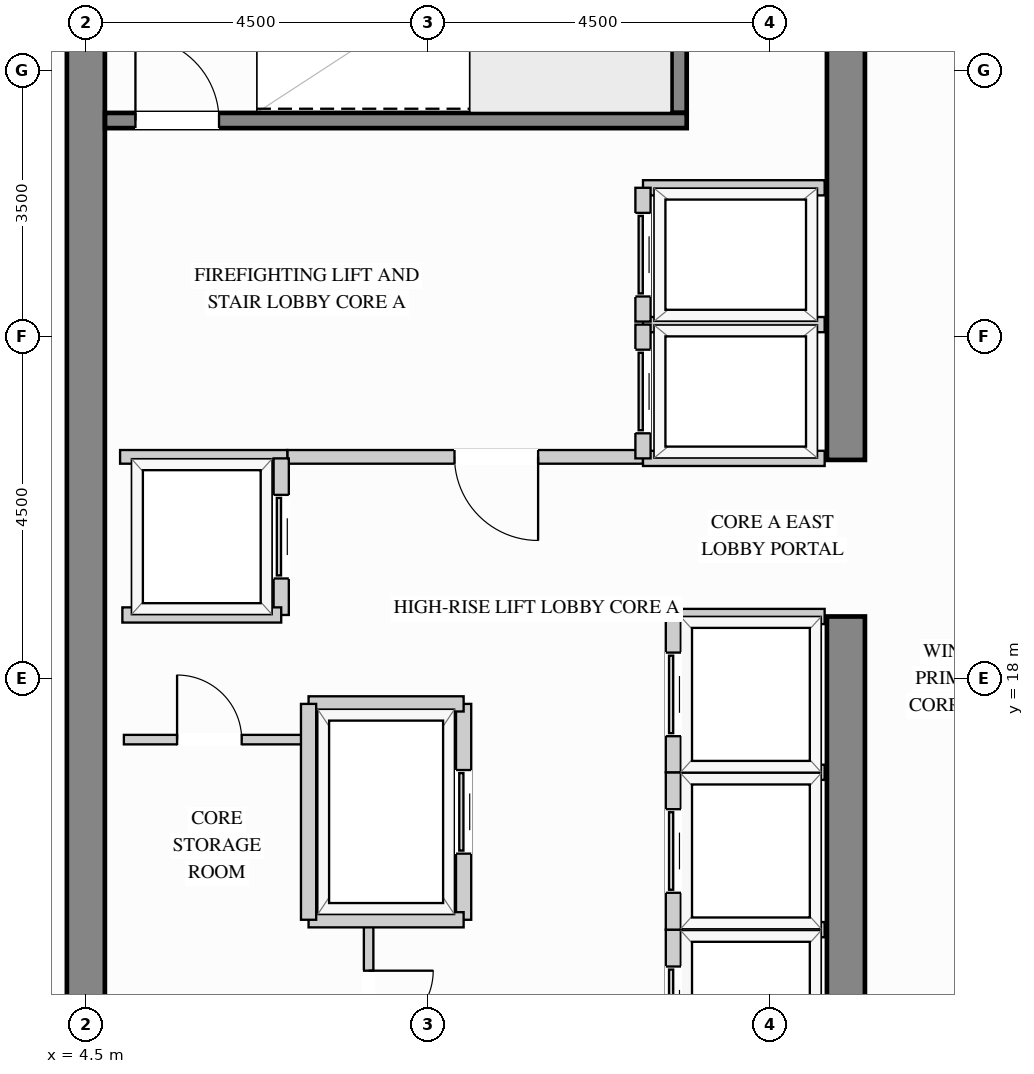
"""IFC4 building model, lengths in metres.
Left out: names, types, materials, properties, quantities, classifications, styles, units other than length and angle.
Written with IfcOpenShell. Run it as: python <this file> out.ifc"""

import sys

from ifc_helpers import new_model, si_unit, direction, frame, frame_2d, origin, place, context, subcontext, project, spatial, rectangle, extrude, source, transform, mapped, element, fill, save


model = new_model("IFC4")
c1 = context("Model", 3, precision=1e-05, world=origin(), true_north=direction((0.0, 1.0)))
c2 = subcontext(c1, "Body", "Model", "MODEL_VIEW")
j1 = project(units=[si_unit("LENGTHUNIT", "METRE"), si_unit("PLANEANGLEUNIT", "RADIAN")], contexts=[c1])
p1 = place(None, origin())
s1 = spatial("IfcSite", under=j1, at=p1, CompositionType="ELEMENT")
p2 = place(p1, origin())
s2 = spatial("IfcBuilding", under=s1, at=p2, CompositionType="ELEMENT")
p3 = place(p2, frame((0.0, 0.0, 237.6)))
s3 = spatial("IfcBuildingStorey", under=s2, at=p3, CompositionType="ELEMENT", Elevation=237.6)
m1 = source(origin(), c2, "Body", "SweptSolid", [
    extrude(rectangle(XDim=10.07, YDim=0.5, at=frame_2d((5.035, 0.0))), origin(), (0.0, 0.0, 1.0), 3.4),
])
p4 = place(p3, frame((14.5, 8.75, 0.0), z_axis=(0.0, 0.0, 1.0), x_axis=(0.0, 1.0, 0.0)))
e1 = element("IfcWall", 1, at=p4, inside=s3, PredefinedType="SHEAR", context=c2, shape_type="MappedRepresentation", body=[
    mapped(m1, transform((0.0, 0.0, 0.0), x_axis=(1.0, 0.0, 0.0), y_axis=(0.0, 1.0, 0.0), z_axis=(0.0, 0.0, 1.0))),
])
m2 = source(origin(), c2, "Body", "SweptSolid", [
    extrude(rectangle(XDim=8.37, YDim=0.5, at=frame_2d((4.185, 0.0))), origin(), (0.0, 0.0, 1.0), 3.4),
])
p5 = place(p3, frame((14.5, 20.88, 0.0), z_axis=(0.0, 0.0, 1.0), x_axis=(0.0, 1.0, 0.0)))
e2 = element("IfcWall", 2, at=p5, inside=s3, PredefinedType="SHEAR", context=c2, shape_type="MappedRepresentation", body=[
    mapped(m2, transform((0.0, 0.0, 0.0), x_axis=(1.0, 0.0, 0.0), y_axis=(0.0, 1.0, 0.0), z_axis=(0.0, 0.0, 1.0))),
])
m3 = source(origin(), c2, "Body", "SweptSolid", [
    extrude(rectangle(XDim=20.5, YDim=0.5, at=frame_2d((10.25, 0.0))), origin(), (0.0, 0.0, 1.0), 3.4),
])
p6 = place(p3, frame((4.5, 8.75, 0.0), z_axis=(0.0, 0.0, 1.0), x_axis=(0.0, 1.0, 0.0)))
e3 = element("IfcWall", 3, at=p6, inside=s3, PredefinedType="SHEAR", context=c2, shape_type="MappedRepresentation", body=[
    mapped(m3, transform((0.0, 0.0, 0.0), x_axis=(1.0, 0.0, 0.0), y_axis=(0.0, 1.0, 0.0), z_axis=(0.0, 0.0, 1.0))),
])
p7 = place(p3, frame((7.15, 20.92, 0.0), z_axis=(0.0, 0.0, 1.0), x_axis=(1.0, 0.0, 0.0)))
e4 = element("IfcWall", 4, at=p7, inside=s3, PredefinedType="PARTITIONING", context=c2, shape_type="SweptSolid", body=[
    extrude(rectangle(XDim=4.68, YDim=0.18, at=frame_2d((2.34, 0.0))), origin(), (0.0, 0.0, 1.0), 3.385),
])
p8 = place(p7, frame((2.2, 0.0, 0.0)))
e5 = element("IfcOpeningElement", 5, at=p8, cuts=e4, PredefinedType="OPENING", context=c2, shape_type="SweptSolid", body=[
    extrude(rectangle(XDim=1.1, YDim=2.15, at=frame_2d((0.55, 1.075))), frame((0.0, 0.1, 0.0), z_axis=(0.0, -1.0, 0.0), x_axis=(1.0, 0.0, 0.0)), (0.0, 0.0, 1.0), 0.2),
])
m4 = source(origin(), c2, "Body", "SweptSolid", [
    extrude(rectangle(XDim=2.2, YDim=0.18, at=frame_2d((1.1, 0.0))), origin(), (0.0, 0.0, 1.0), 3.385),
])
p9 = place(p3, frame((4.95, 20.92, 0.0), z_axis=(0.0, 0.0, 1.0), x_axis=(1.0, 0.0, 0.0)))
e6 = element("IfcWall", 6, at=p9, inside=s3, PredefinedType="PARTITIONING", context=c2, shape_type="MappedRepresentation", body=[
    mapped(m4, transform((0.0, 0.0, 0.0), x_axis=(1.0, 0.0, 0.0), y_axis=(0.0, 1.0, 0.0), z_axis=(0.0, 0.0, 1.0))),
])
p10 = place(p3, frame((8.22, 12.75, 0.0), z_axis=(0.0, 0.0, 1.0), x_axis=(0.0, 1.0, 0.0)))
e7 = element("IfcWall", 7, at=p10, inside=s3, PredefinedType="PARTITIONING", context=c2, shape_type="SweptSolid", body=[
    extrude(rectangle(XDim=2.07, YDim=0.125, at=frame_2d((1.035, 0.0))), origin(), (0.0, 0.0, 1.0), 3.385),
])
p11 = place(p10, frame((0.56, 0.0, 0.0)))
e8 = element("IfcOpeningElement", 8, at=p11, cuts=e7, PredefinedType="OPENING", context=c2, shape_type="SweptSolid", body=[
    extrude(rectangle(XDim=0.85, YDim=2.1, at=frame_2d((0.425, 1.05))), frame((0.0, 0.073, 0.0), z_axis=(0.0, -1.0, 0.0), x_axis=(1.0, 0.0, 0.0)), (0.0, 0.0, 1.0), 0.145),
])
p12 = place(p3, frame((5.0, 17.2, 0.0), z_axis=(0.0, 0.0, 1.0), x_axis=(1.0, 0.0, 0.0)))
e9 = element("IfcWall", 9, at=p12, inside=s3, PredefinedType="PARTITIONING", context=c2, shape_type="SweptSolid", body=[
    extrude(rectangle(XDim=2.4, YDim=0.125, at=frame_2d((1.2, 0.0))), origin(), (0.0, 0.0, 1.0), 3.385),
])
p13 = place(p12, frame((0.7, 0.0, 0.0)))
e10 = element("IfcOpeningElement", 10, at=p13, cuts=e9, PredefinedType="OPENING", context=c2, shape_type="SweptSolid", body=[
    extrude(rectangle(XDim=0.85, YDim=2.1, at=frame_2d((0.425, 1.05))), frame((0.0, 0.073, 0.0), z_axis=(0.0, -1.0, 0.0), x_axis=(1.0, 0.0, 0.0)), (0.0, 0.0, 1.0), 0.145),
])
m5 = source(origin(), c2, "Body", "SweptSolid", [
    extrude(rectangle(XDim=2.39, YDim=0.2, at=frame_2d((1.195, 0.0))), origin(), (0.0, 0.0, 1.0), 3.385),
])
for number, where, z_axis, x_axis in (
    (11, (11.83, 22.66, 0.0), (0.0, 0.0, 1.0), (1.0, 0.0, 0.0)),
    (12, (11.83, 20.9, 0.0), (0.0, 0.0, 1.0), (1.0, 0.0, 0.0)),
):
    element("IfcWall", number, at=place(p3, frame(where, z_axis=z_axis, x_axis=x_axis)), inside=s3, PredefinedType="PARTITIONING", context=c2, shape_type="MappedRepresentation", body=[
        mapped(m5, transform((0.0, 0.0, 0.0), x_axis=(1.0, 0.0, 0.0), y_axis=(0.0, 1.0, 0.0), z_axis=(0.0, 0.0, 1.0))),
    ])
p14 = place(p3, frame((11.83, 20.9, 0.0), z_axis=(0.0, 0.0, 1.0), x_axis=(0.0, 1.0, 0.0)))
e13 = element("IfcWall", 13, at=p14, inside=s3, PredefinedType="PARTITIONING", context=c2, shape_type="SweptSolid", body=[
    extrude(rectangle(XDim=1.76, YDim=0.2, at=frame_2d((0.88, 0.0))), origin(), (0.0, 0.0, 1.0), 3.385),
])
p15 = place(p14, frame((0.33, 0.0, 0.0)))
e14 = element("IfcOpeningElement", 14, at=p15, cuts=e13, PredefinedType="OPENING", context=c2, shape_type="SweptSolid", body=[
    extrude(rectangle(XDim=1.1, YDim=2.2, at=frame_2d((0.55, 1.1))), frame((0.0, 0.11, 0.0), z_axis=(0.0, -1.0, 0.0), x_axis=(1.0, 0.0, 0.0)), (0.0, 0.0, 1.0), 0.22),
])
p16 = place(p3, frame((11.83, 24.46, 0.0), z_axis=(0.0, 0.0, 1.0), x_axis=(1.0, 0.0, 0.0)))
e15 = element("IfcWall", 15, at=p16, inside=s3, PredefinedType="PARTITIONING", context=c2, shape_type="MappedRepresentation", body=[
    mapped(m5, transform((0.0, 0.0, 0.0), x_axis=(1.0, 0.0, 0.0), y_axis=(0.0, 1.0, 0.0), z_axis=(0.0, 0.0, 1.0))),
])
p17 = place(p3, frame((11.83, 22.7, 0.0), z_axis=(0.0, 0.0, 1.0), x_axis=(0.0, 1.0, 0.0)))
e16 = element("IfcWall", 16, at=p17, inside=s3, PredefinedType="PARTITIONING", context=c2, shape_type="SweptSolid", body=[
    extrude(rectangle(XDim=1.76, YDim=0.2, at=frame_2d((0.88, 0.0))), origin(), (0.0, 0.0, 1.0), 3.385),
])
p18 = place(p17, frame((0.33, 0.0, 0.0)))
e17 = element("IfcOpeningElement", 17, at=p18, cuts=e16, PredefinedType="OPENING", context=c2, shape_type="SweptSolid", body=[
    extrude(rectangle(XDim=1.1, YDim=2.2, at=frame_2d((0.55, 1.1))), frame((0.0, 0.11, 0.0), z_axis=(0.0, -1.0, 0.0), x_axis=(1.0, 0.0, 0.0)), (0.0, 0.0, 1.0), 0.22),
])
m6 = source(origin(), c2, "Body", "SweptSolid", [
    extrude(rectangle(XDim=1.99, YDim=0.2, at=frame_2d((0.995, 0.0))), origin(), (0.0, 0.0, 1.0), 3.385),
])
p19 = place(p3, frame((12.23, 14.7, 0.0), z_axis=(0.0, 0.0, 1.0), x_axis=(1.0, 0.0, 0.0)))
e18 = element("IfcWall", 18, at=p19, inside=s3, PredefinedType="PARTITIONING", context=c2, shape_type="MappedRepresentation", body=[
    mapped(m6, transform((0.0, 0.0, 0.0), x_axis=(1.0, 0.0, 0.0), y_axis=(0.0, 1.0, 0.0), z_axis=(0.0, 0.0, 1.0))),
])
p20 = place(p3, frame((12.23, 12.63, 0.0), z_axis=(0.0, 0.0, 1.0), x_axis=(0.0, 1.0, 0.0)))
e19 = element("IfcWall", 19, at=p20, inside=s3, PredefinedType="PARTITIONING", context=c2, shape_type="SweptSolid", body=[
    extrude(rectangle(XDim=2.07, YDim=0.2, at=frame_2d((1.035, 0.0))), origin(), (0.0, 0.0, 1.0), 3.385),
])
p21 = place(p20, frame((0.485, 0.0, 0.0)))
e20 = element("IfcOpeningElement", 20, at=p21, cuts=e19, PredefinedType="OPENING", context=c2, shape_type="SweptSolid", body=[
    extrude(rectangle(XDim=1.1, YDim=2.2, at=frame_2d((0.55, 1.1))), frame((0.0, 0.11, 0.0), z_axis=(0.0, -1.0, 0.0), x_axis=(1.0, 0.0, 0.0)), (0.0, 0.0, 1.0), 0.22),
])
p22 = place(p3, frame((12.23, 16.77, 0.0), z_axis=(0.0, 0.0, 1.0), x_axis=(1.0, 0.0, 0.0)))
e21 = element("IfcWall", 21, at=p22, inside=s3, PredefinedType="PARTITIONING", context=c2, shape_type="MappedRepresentation", body=[
    mapped(m6, transform((0.0, 0.0, 0.0), x_axis=(1.0, 0.0, 0.0), y_axis=(0.0, 1.0, 0.0), z_axis=(0.0, 0.0, 1.0))),
])
p23 = place(p3, frame((12.23, 14.7, 0.0), z_axis=(0.0, 0.0, 1.0), x_axis=(0.0, 1.0, 0.0)))
e22 = element("IfcWall", 22, at=p23, inside=s3, PredefinedType="PARTITIONING", context=c2, shape_type="SweptSolid", body=[
    extrude(rectangle(XDim=2.07, YDim=0.2, at=frame_2d((1.035, 0.0))), origin(), (0.0, 0.0, 1.0), 3.385),
])
p24 = place(p23, frame((0.485, 0.0, 0.0)))
e23 = element("IfcOpeningElement", 23, at=p24, cuts=e22, PredefinedType="OPENING", context=c2, shape_type="SweptSolid", body=[
    extrude(rectangle(XDim=1.1, YDim=2.2, at=frame_2d((0.55, 1.1))), frame((0.0, 0.11, 0.0), z_axis=(0.0, -1.0, 0.0), x_axis=(1.0, 0.0, 0.0)), (0.0, 0.0, 1.0), 0.22),
])
p25 = place(p3, frame((12.23, 18.82, 0.0), z_axis=(0.0, 0.0, 1.0), x_axis=(1.0, 0.0, 0.0)))
e24 = element("IfcWall", 24, at=p25, inside=s3, PredefinedType="PARTITIONING", context=c2, shape_type="MappedRepresentation", body=[
    mapped(m6, transform((0.0, 0.0, 0.0), x_axis=(1.0, 0.0, 0.0), y_axis=(0.0, 1.0, 0.0), z_axis=(0.0, 0.0, 1.0))),
])
p26 = place(p3, frame((12.23, 16.77, 0.0), z_axis=(0.0, 0.0, 1.0), x_axis=(0.0, 1.0, 0.0)))
e25 = element("IfcWall", 25, at=p26, inside=s3, PredefinedType="PARTITIONING", context=c2, shape_type="SweptSolid", body=[
    extrude(rectangle(XDim=2.05, YDim=0.2, at=frame_2d((1.025, 0.0))), origin(), (0.0, 0.0, 1.0), 3.385),
])
p27 = place(p26, frame((0.475, 0.0, 0.0)))
e26 = element("IfcOpeningElement", 26, at=p27, cuts=e25, PredefinedType="OPENING", context=c2, shape_type="SweptSolid", body=[
    extrude(rectangle(XDim=1.1, YDim=2.2, at=frame_2d((0.55, 1.1))), frame((0.0, 0.11, 0.0), z_axis=(0.0, -1.0, 0.0), x_axis=(1.0, 0.0, 0.0)), (0.0, 0.0, 1.0), 0.22),
])
p28 = place(p3, frame((7.07, 18.84, 0.0), z_axis=(0.0, 0.0, 1.0), x_axis=(0.0, 1.0, 0.0)))
e27 = element("IfcWall", 27, at=p28, inside=s3, PredefinedType="PARTITIONING", context=c2, shape_type="SweptSolid", body=[
    extrude(rectangle(XDim=2.06, YDim=0.2, at=frame_2d((1.03, 0.0))), origin(), (0.0, 0.0, 1.0), 3.385),
])
p29 = place(p28, frame((0.48, 0.0, 0.0)))
e28 = element("IfcOpeningElement", 28, at=p29, cuts=e27, PredefinedType="OPENING", context=c2, shape_type="SweptSolid", body=[
    extrude(rectangle(XDim=1.1, YDim=2.2, at=frame_2d((0.55, 1.1))), frame((0.0, 0.11, 0.0), z_axis=(0.0, -1.0, 0.0), x_axis=(1.0, 0.0, 0.0)), (0.0, 0.0, 1.0), 0.22),
])
m7 = source(origin(), c2, "Body", "SweptSolid", [
    extrude(rectangle(XDim=2.09, YDim=0.2, at=frame_2d((1.045, 0.0))), origin(), (0.0, 0.0, 1.0), 3.385),
])
p30 = place(p3, frame((4.98, 18.84, 0.0), z_axis=(0.0, 0.0, 1.0), x_axis=(1.0, 0.0, 0.0)))
e29 = element("IfcWall", 29, at=p30, inside=s3, PredefinedType="PARTITIONING", context=c2, shape_type="MappedRepresentation", body=[
    mapped(m7, transform((0.0, 0.0, 0.0), x_axis=(1.0, 0.0, 0.0), y_axis=(0.0, 1.0, 0.0), z_axis=(0.0, 0.0, 1.0))),
])
p31 = place(p3, frame((9.47, 14.83, 0.0), z_axis=(0.0, 0.0, 1.0), x_axis=(0.0, 1.0, 0.0)))
e30 = element("IfcWall", 30, at=p31, inside=s3, PredefinedType="PARTITIONING", context=c2, shape_type="SweptSolid", body=[
    extrude(rectangle(XDim=2.84, YDim=0.2, at=frame_2d((1.42, 0.0))), origin(), (0.0, 0.0, 1.0), 3.385),
])
p32 = place(p31, frame((0.87, 0.0, 0.0)))
e31 = element("IfcOpeningElement", 31, at=p32, cuts=e30, PredefinedType="OPENING", context=c2, shape_type="SweptSolid", body=[
    extrude(rectangle(XDim=1.1, YDim=2.2, at=frame_2d((0.55, 1.1))), frame((0.0, 0.11, 0.0), z_axis=(0.0, -1.0, 0.0), x_axis=(1.0, 0.0, 0.0)), (0.0, 0.0, 1.0), 0.22),
])
m8 = source(origin(), c2, "Body", "SweptSolid", [
    extrude(rectangle(XDim=2.04, YDim=0.2, at=frame_2d((1.02, 0.0))), origin(), (0.0, 0.0, 1.0), 3.385),
])
for number, where, z_axis, x_axis in (
    (32, (7.43, 17.67, 0.0), (0.0, 0.0, 1.0), (1.0, 0.0, 0.0)),
    (33, (7.43, 14.83, 0.0), (0.0, 0.0, 1.0), (1.0, 0.0, 0.0)),
):
    element("IfcWall", number, at=place(p3, frame(where, z_axis=z_axis, x_axis=x_axis)), inside=s3, PredefinedType="PARTITIONING", context=c2, shape_type="MappedRepresentation", body=[
        mapped(m8, transform((0.0, 0.0, 0.0), x_axis=(1.0, 0.0, 0.0), y_axis=(0.0, 1.0, 0.0), z_axis=(0.0, 0.0, 1.0))),
    ])
m9 = source(origin(), c2, "Body", "SweptSolid", [
    extrude(rectangle(XDim=2.84, YDim=0.2, at=frame_2d((1.42, 0.0))), origin(), (0.0, 0.0, 1.0), 3.385),
])
p33 = place(p3, frame((7.43, 14.83, 0.0), z_axis=(0.0, 0.0, 1.0), x_axis=(0.0, 1.0, 0.0)))
e34 = element("IfcWall", 34, at=p33, inside=s3, PredefinedType="PARTITIONING", context=c2, shape_type="MappedRepresentation", body=[
    mapped(m9, transform((0.0, 0.0, 0.0), x_axis=(1.0, 0.0, 0.0), y_axis=(0.0, 1.0, 0.0), z_axis=(0.0, 0.0, 1.0))),
])
m10 = source(origin(), c2, "Body", "SweptSolid", [
    extrude(rectangle(XDim=3.803, YDim=0.2, at=frame_2d((1.901, 0.0))), origin(), (0.0, 0.0, 1.0), 3.4),
])
p34 = place(p3, frame((12.305, 25.445, 0.0), z_axis=(0.0, 0.0, 1.0), x_axis=(0.0, 1.0, 0.0)))
e35 = element("IfcWall", 35, at=p34, inside=s3, PredefinedType="SHEAR", context=c2, shape_type="MappedRepresentation", body=[
    mapped(m10, transform((0.0, 0.0, 0.0), x_axis=(1.0, 0.0, 0.0), y_axis=(0.0, 1.0, 0.0), z_axis=(0.0, 0.0, 1.0))),
])
p35 = place(p3, frame((4.752, 25.345, 0.0), z_axis=(0.0, 0.0, 1.0), x_axis=(1.0, 0.0, 0.0)))
e36 = element("IfcWall", 36, at=p35, inside=s3, PredefinedType="SHEAR", context=c2, shape_type="SweptSolid", body=[
    extrude(rectangle(XDim=7.653, YDim=0.2, at=frame_2d((3.827, 0.0))), origin(), (0.0, 0.0, 1.0), 3.4),
])
p36 = place(p35, frame((0.4, 0.0, 0.0)))
e37 = element("IfcOpeningElement", 37, at=p36, cuts=e36, PredefinedType="OPENING", context=c2, shape_type="SweptSolid", body=[
    extrude(rectangle(XDim=1.1, YDim=2.15, at=frame_2d((0.55, 1.075))), frame((0.0, 0.11, 0.0), z_axis=(0.0, -1.0, 0.0), x_axis=(1.0, 0.0, 0.0)), (0.0, 0.0, 1.0), 0.22),
])
m11 = source(origin(), c2, "Body", "SweptSolid", [
    extrude(rectangle(XDim=1.1, YDim=2.15, at=frame_2d((0.55, 1.075))), frame((0.0, 0.025, 0.0), z_axis=(0.0, -1.0, 0.0), x_axis=(1.0, 0.0, 0.0)), (0.0, 0.0, 1.0), 0.05),
])
p37 = place(p8, origin())
e38 = element("IfcDoor", 38, at=p37, inside=s3, OperationType="SINGLE_SWING_RIGHT", PredefinedType="DOOR", context=c2, shape_type="MappedRepresentation", body=[
    mapped(m11, transform((0.0, 0.0, 0.0), x_axis=(1.0, 0.0, 0.0), y_axis=(0.0, 1.0, 0.0), z_axis=(0.0, 0.0, 1.0))),
])
fill(e5, e38)
m12 = source(origin(), c2, "Body", "SweptSolid", [
    extrude(rectangle(XDim=1.1, YDim=2.2, at=frame_2d((0.55, 1.1))), frame((0.0, 0.025, 0.0), z_axis=(0.0, -1.0, 0.0), x_axis=(1.0, 0.0, 0.0)), (0.0, 0.0, 1.0), 0.05),
])
p38 = place(p15, origin())
e39 = element("IfcDoor", 39, at=p38, inside=s3, OperationType="SLIDING_TO_LEFT", PredefinedType="DOOR", context=c2, shape_type="MappedRepresentation", body=[
    mapped(m12, transform((0.0, 0.0, 0.0), x_axis=(1.0, 0.0, 0.0), y_axis=(0.0, 1.0, 0.0), z_axis=(0.0, 0.0, 1.0))),
])
fill(e14, e39)
p39 = place(p18, origin())
e40 = element("IfcDoor", 40, at=p39, inside=s3, OperationType="SLIDING_TO_LEFT", PredefinedType="DOOR", context=c2, shape_type="MappedRepresentation", body=[
    mapped(m12, transform((0.0, 0.0, 0.0), x_axis=(1.0, 0.0, 0.0), y_axis=(0.0, 1.0, 0.0), z_axis=(0.0, 0.0, 1.0))),
])
fill(e17, e40)
p40 = place(p21, origin())
e41 = element("IfcDoor", 41, at=p40, inside=s3, OperationType="SLIDING_TO_LEFT", PredefinedType="DOOR", context=c2, shape_type="MappedRepresentation", body=[
    mapped(m12, transform((0.0, 0.0, 0.0), x_axis=(1.0, 0.0, 0.0), y_axis=(0.0, 1.0, 0.0), z_axis=(0.0, 0.0, 1.0))),
])
fill(e20, e41)
p41 = place(p24, origin())
e42 = element("IfcDoor", 42, at=p41, inside=s3, OperationType="SLIDING_TO_LEFT", PredefinedType="DOOR", context=c2, shape_type="MappedRepresentation", body=[
    mapped(m12, transform((0.0, 0.0, 0.0), x_axis=(1.0, 0.0, 0.0), y_axis=(0.0, 1.0, 0.0), z_axis=(0.0, 0.0, 1.0))),
])
fill(e23, e42)
p42 = place(p27, origin())
e43 = element("IfcDoor", 43, at=p42, inside=s3, OperationType="SLIDING_TO_LEFT", PredefinedType="DOOR", context=c2, shape_type="MappedRepresentation", body=[
    mapped(m12, transform((0.0, 0.0, 0.0), x_axis=(1.0, 0.0, 0.0), y_axis=(0.0, 1.0, 0.0), z_axis=(0.0, 0.0, 1.0))),
])
fill(e26, e43)
p43 = place(p29, origin())
e44 = element("IfcDoor", 44, at=p43, inside=s3, OperationType="SLIDING_TO_LEFT", PredefinedType="DOOR", context=c2, shape_type="MappedRepresentation", body=[
    mapped(m12, transform((0.0, 0.0, 0.0), x_axis=(1.0, 0.0, 0.0), y_axis=(0.0, 1.0, 0.0), z_axis=(0.0, 0.0, 1.0))),
])
fill(e28, e44)
p44 = place(p32, origin())
e45 = element("IfcDoor", 45, at=p44, inside=s3, OperationType="SLIDING_TO_LEFT", PredefinedType="DOOR", context=c2, shape_type="MappedRepresentation", body=[
    mapped(m12, transform((0.0, 0.0, 0.0), x_axis=(1.0, 0.0, 0.0), y_axis=(0.0, 1.0, 0.0), z_axis=(0.0, 0.0, 1.0))),
])
fill(e31, e45)
m13 = source(origin(), c2, "Body", "SweptSolid", [
    extrude(rectangle(XDim=0.85, YDim=2.1, at=frame_2d((0.425, 1.05))), frame((0.0, 0.025, 0.0), z_axis=(0.0, -1.0, 0.0), x_axis=(1.0, 0.0, 0.0)), (0.0, 0.0, 1.0), 0.05),
])
p45 = place(p13, origin())
e46 = element("IfcDoor", 46, at=p45, inside=s3, OperationType="SINGLE_SWING_LEFT", PredefinedType="DOOR", context=c2, shape_type="MappedRepresentation", body=[
    mapped(m13, transform((0.0, 0.0, 0.0), x_axis=(1.0, 0.0, 0.0), y_axis=(0.0, 1.0, 0.0), z_axis=(0.0, 0.0, 1.0))),
])
fill(e10, e46)
p46 = place(p11, origin())
e47 = element("IfcDoor", 47, at=p46, inside=s3, OperationType="SINGLE_SWING_RIGHT", PredefinedType="DOOR", context=c2, shape_type="MappedRepresentation", body=[
    mapped(m13, transform((0.0, 0.0, 0.0), x_axis=(1.0, 0.0, 0.0), y_axis=(0.0, 1.0, 0.0), z_axis=(0.0, 0.0, 1.0))),
])
fill(e8, e47)
m14 = source(origin(), c2, "Body", "SweptSolid", [
    extrude(rectangle(XDim=1.1, YDim=2.15, at=frame_2d((0.55, 1.075))), frame((0.0, 0.025, 0.0), z_axis=(0.0, -1.0, 0.0), x_axis=(1.0, 0.0, 0.0)), (0.0, 0.0, 1.0), 0.05),
])
p47 = place(p36, origin())
e48 = element("IfcDoor", 48, at=p47, inside=s3, OperationType="SINGLE_SWING_LEFT", PredefinedType="DOOR", context=c2, shape_type="MappedRepresentation", body=[
    mapped(m14, transform((0.0, 0.0, 0.0), x_axis=(1.0, 0.0, 0.0), y_axis=(0.0, 1.0, 0.0), z_axis=(0.0, 0.0, 1.0))),
])
fill(e37, e48)
save(model, sys.argv[1])
